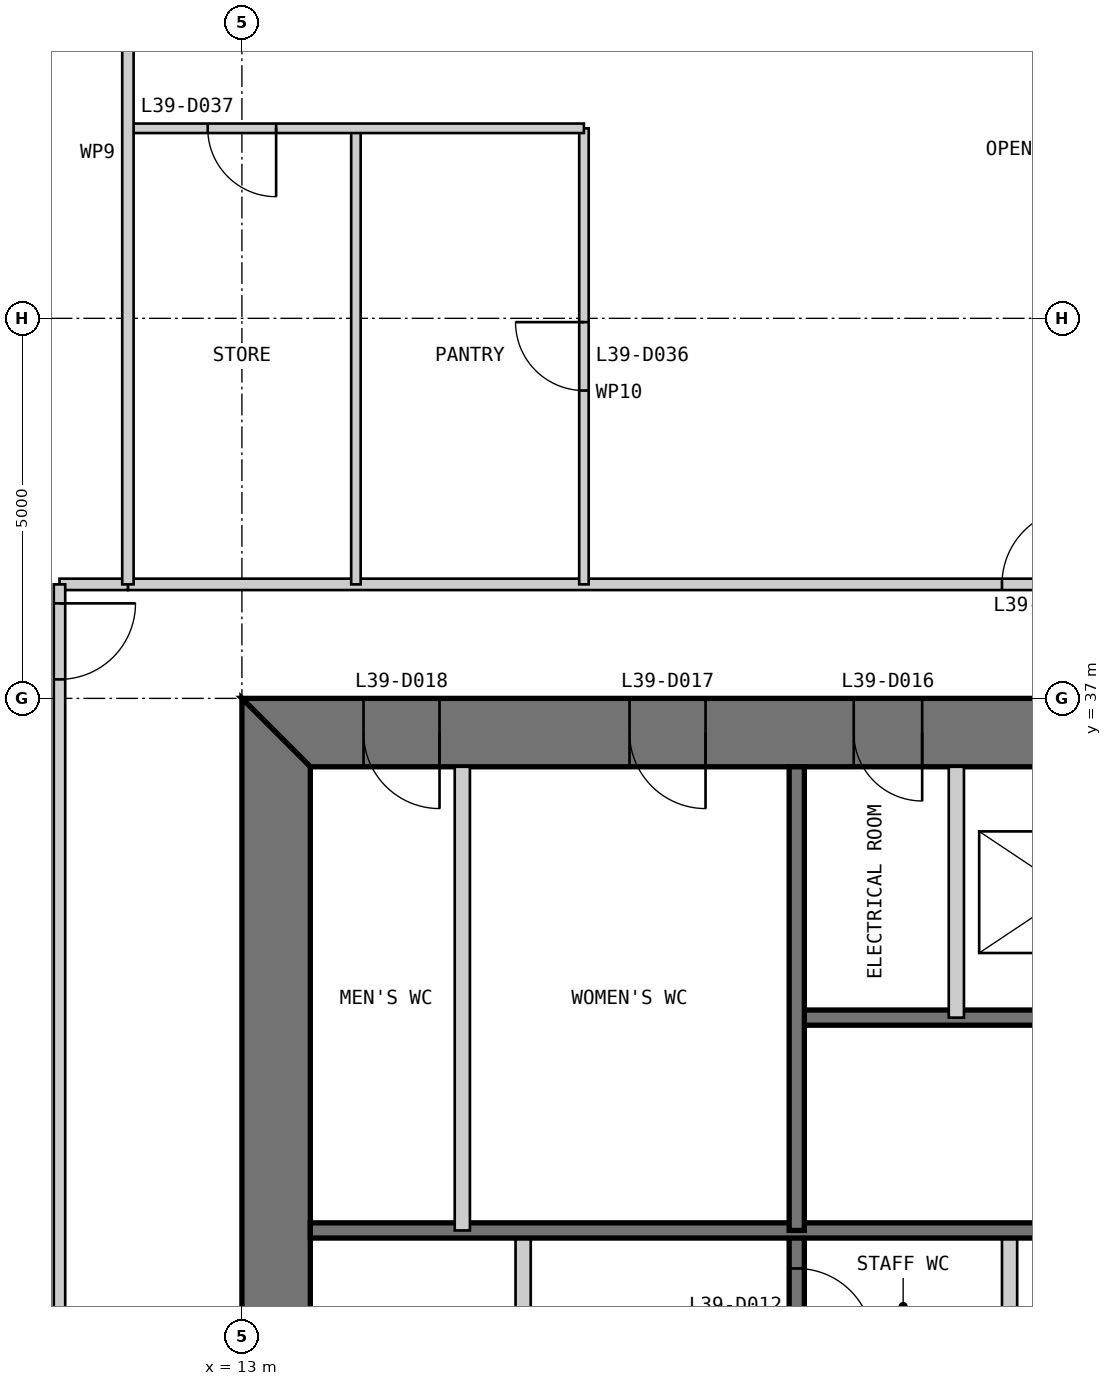
"""IFC4 building model, lengths in metres.
Left out: names, types, materials, properties, quantities, classifications, styles, units other than length and angle.
Written with IfcOpenShell. Run it as: python <this file> out.ifc"""

import sys

from ifc_helpers import new_model, si_unit, direction, frame, frame_2d, origin, place, context, subcontext, project, spatial, polyline, rectangle, outline, extrude, element, fill, save


model = new_model("IFC4")
c1 = context("Model", 3, precision=1e-05, world=origin(), true_north=direction((0.0, 1.0)))
c2 = subcontext(c1, "Body", "Model", "MODEL_VIEW")
j1 = project(units=[si_unit("LENGTHUNIT", "METRE"), si_unit("PLANEANGLEUNIT", "RADIAN")], contexts=[c1])
p1 = place(None, origin())
s1 = spatial("IfcSite", under=j1, at=p1, CompositionType="ELEMENT")
p2 = place(p1, origin())
s2 = spatial("IfcBuilding", under=s1, at=p2, CompositionType="ELEMENT")
p3 = place(p2, frame((0.0, 0.0, 168.4)))
s3 = spatial("IfcBuildingStorey", under=s2, at=p3, CompositionType="ELEMENT", Elevation=168.4)
p4 = place(p3, frame((37.0, 36.55, 0.0), z_axis=(0.0, 0.0, 1.0), x_axis=(-1.0, 0.0, 0.0)))
e1 = element("IfcWall", 1, at=p4, inside=s3, PredefinedType="SHEAR", context=c2, shape_type="SweptSolid", body=[
    extrude(outline(polyline([(0.0, -0.45), (24.0, -0.45), (23.1, 0.45), (0.9, 0.45), (0.0, -0.45)])), origin(), (0.0, 0.0, 1.0), 5.4),
])
p5 = place(p4, frame((4.9, 0.0, 0.0)))
e2 = element("IfcOpeningElement", 2, at=p5, cuts=e1, PredefinedType="OPENING", context=c2, shape_type="SweptSolid", body=[
    extrude(rectangle(XDim=1.0, YDim=2.2, at=frame_2d((0.5, 1.1))), frame((0.0, 0.46, 0.0), z_axis=(0.0, -1.0, 0.0), x_axis=(1.0, 0.0, 0.0)), (0.0, 0.0, 1.0), 0.92),
])
p6 = place(p4, frame((8.9, 0.0, 0.0)))
e3 = element("IfcOpeningElement", 3, at=p6, cuts=e1, PredefinedType="OPENING", context=c2, shape_type="SweptSolid", body=[
    extrude(rectangle(XDim=1.1, YDim=2.2, at=frame_2d((0.55, 1.1))), frame((0.0, 0.46, 0.0), z_axis=(0.0, -1.0, 0.0), x_axis=(1.0, 0.0, 0.0)), (0.0, 0.0, 1.0), 0.92),
])
p7 = place(p4, frame((15.05, 0.0, 0.0)))
e4 = element("IfcOpeningElement", 4, at=p7, cuts=e1, PredefinedType="OPENING", context=c2, shape_type="SweptSolid", body=[
    extrude(rectangle(XDim=0.9, YDim=2.2, at=frame_2d((0.45, 1.1))), frame((0.0, 0.46, 0.0), z_axis=(0.0, -1.0, 0.0), x_axis=(1.0, 0.0, 0.0)), (0.0, 0.0, 1.0), 0.92),
])
p8 = place(p4, frame((17.9, 0.0, 0.0)))
e5 = element("IfcOpeningElement", 5, at=p8, cuts=e1, PredefinedType="OPENING", context=c2, shape_type="SweptSolid", body=[
    extrude(rectangle(XDim=1.0, YDim=2.2, at=frame_2d((0.5, 1.1))), frame((0.0, 0.46, 0.0), z_axis=(0.0, -1.0, 0.0), x_axis=(1.0, 0.0, 0.0)), (0.0, 0.0, 1.0), 0.92),
])
p9 = place(p4, frame((21.4, 0.0, 0.0)))
e6 = element("IfcOpeningElement", 6, at=p9, cuts=e1, PredefinedType="OPENING", context=c2, shape_type="SweptSolid", body=[
    extrude(rectangle(XDim=1.0, YDim=2.2, at=frame_2d((0.5, 1.1))), frame((0.0, 0.46, 0.0), z_axis=(0.0, -1.0, 0.0), x_axis=(1.0, 0.0, 0.0)), (0.0, 0.0, 1.0), 0.92),
])
p10 = place(p3, frame((13.45, 36.1, 0.0), z_axis=(0.0, 0.0, 1.0), x_axis=(0.0, -1.0, 0.0)))
e7 = element("IfcWall", 7, at=p10, inside=s3, PredefinedType="SHEAR", context=c2, shape_type="SweptSolid", body=[
    extrude(outline(polyline([(-0.9, -0.45), (23.1, -0.45), (22.2, 0.45), (0.0, 0.45), (-0.9, -0.45)])), origin(), (0.0, 0.0, 1.0), 5.4),
])
p11 = place(p10, frame((20.2, 0.0, 0.0)))
e8 = element("IfcOpeningElement", 8, at=p11, cuts=e7, PredefinedType="OPENING", context=c2, shape_type="SweptSolid", body=[
    extrude(rectangle(XDim=1.0, YDim=2.2, at=frame_2d((0.5, 1.1))), frame((0.0, 0.46, 0.0), z_axis=(0.0, -1.0, 0.0), x_axis=(1.0, 0.0, 0.0)), (0.0, 0.0, 1.0), 0.92),
])
p12 = place(p10, frame((17.25, 0.0, 0.0)))
e9 = element("IfcOpeningElement", 9, at=p12, cuts=e7, PredefinedType="OPENING", context=c2, shape_type="SweptSolid", body=[
    extrude(rectangle(XDim=0.9, YDim=2.2, at=frame_2d((0.45, 1.1))), frame((0.0, 0.46, 0.0), z_axis=(0.0, -1.0, 0.0), x_axis=(1.0, 0.0, 0.0)), (0.0, 0.0, 1.0), 0.92),
])
p13 = place(p3, frame((16.7, 13.9, 0.0), z_axis=(0.0, 0.0, 1.0), x_axis=(0.0, 1.0, 0.0)))
e10 = element("IfcWall", 10, at=p13, inside=s3, PredefinedType="PARTITIONING", context=c2, shape_type="SweptSolid", body=[
    extrude(rectangle(XDim=16.1, YDim=0.2, at=frame_2d((8.05, 0.0))), origin(), (0.0, 0.0, 1.0), 5.2),
])
p14 = place(p13, frame((7.95, 0.0, 0.0)))
e11 = element("IfcOpeningElement", 11, at=p14, cuts=e10, PredefinedType="OPENING", context=c2, shape_type="SweptSolid", body=[
    extrude(rectangle(XDim=0.9, YDim=2.2, at=frame_2d((0.45, 1.1))), frame((0.0, 0.11, 0.0), z_axis=(0.0, -1.0, 0.0), x_axis=(1.0, 0.0, 0.0)), (0.0, 0.0, 1.0), 0.22),
])
p15 = place(p13, frame((13.3, 0.0, 0.0)))
e12 = element("IfcOpeningElement", 12, at=p15, cuts=e10, PredefinedType="OPENING", context=c2, shape_type="SweptSolid", body=[
    extrude(rectangle(XDim=0.9, YDim=2.2, at=frame_2d((0.45, 1.1))), frame((0.0, 0.11, 0.0), z_axis=(0.0, -1.0, 0.0), x_axis=(1.0, 0.0, 0.0)), (0.0, 0.0, 1.0), 0.22),
])
p16 = place(p3, frame((20.3, 13.9, 0.0), z_axis=(0.0, 0.0, 1.0), x_axis=(0.0, 1.0, 0.0)))
e13 = element("IfcWall", 13, at=p16, inside=s3, PredefinedType="SOLIDWALL", context=c2, shape_type="SweptSolid", body=[
    extrude(rectangle(XDim=16.1, YDim=0.2, at=frame_2d((8.05, 0.0))), origin(), (0.0, 0.0, 1.0), 5.2),
])
p17 = place(p16, frame((9.65, 0.0, 0.0)))
e14 = element("IfcOpeningElement", 14, at=p17, cuts=e13, PredefinedType="OPENING", context=c2, shape_type="SweptSolid", body=[
    extrude(rectangle(XDim=0.9, YDim=2.2, at=frame_2d((0.45, 1.1))), frame((0.0, 0.11, 0.0), z_axis=(0.0, -1.0, 0.0), x_axis=(1.0, 0.0, 0.0)), (0.0, 0.0, 1.0), 0.22),
])
p18 = place(p16, frame((14.6, 0.0, 0.0)))
e15 = element("IfcOpeningElement", 15, at=p18, cuts=e13, PredefinedType="OPENING", context=c2, shape_type="SweptSolid", body=[
    extrude(rectangle(XDim=1.0, YDim=2.2, at=frame_2d((0.5, 1.1))), frame((0.0, 0.11, 0.0), z_axis=(0.0, -1.0, 0.0), x_axis=(1.0, 0.0, 0.0)), (0.0, 0.0, 1.0), 0.22),
])
p19 = place(p3, frame((23.1, 20.0, 0.0), z_axis=(0.0, 0.0, 1.0), x_axis=(0.0, 1.0, 0.0)))
e16 = element("IfcWall", 16, at=p19, inside=s3, PredefinedType="PARTITIONING", context=c2, shape_type="SweptSolid", body=[
    extrude(rectangle(XDim=10.0, YDim=0.2, at=frame_2d((5.0, 0.0))), origin(), (0.0, 0.0, 1.0), 5.2),
])
p20 = place(p3, frame((29.7, 32.8, 0.0), z_axis=(0.0, 0.0, 1.0), x_axis=(-1.0, 0.0, 0.0)))
e17 = element("IfcWall", 17, at=p20, inside=s3, PredefinedType="SOLIDWALL", context=c2, shape_type="SweptSolid", body=[
    extrude(rectangle(XDim=9.4, YDim=0.2, at=frame_2d((4.7, 0.0))), origin(), (0.0, 0.0, 1.0), 5.2),
])
p21 = place(p20, frame((0.25, 0.0, 0.0)))
e18 = element("IfcOpeningElement", 18, at=p21, cuts=e17, PredefinedType="OPENING", context=c2, shape_type="SweptSolid", body=[
    extrude(rectangle(XDim=1.0, YDim=2.2, at=frame_2d((0.5, 1.1))), frame((0.0, 0.11, 0.0), z_axis=(0.0, -1.0, 0.0), x_axis=(1.0, 0.0, 0.0)), (0.0, 0.0, 1.0), 0.22),
])
p22 = place(p3, frame((29.7, 30.0, 0.0), z_axis=(0.0, 0.0, 1.0), x_axis=(-1.0, 0.0, 0.0)))
e19 = element("IfcWall", 19, at=p22, inside=s3, PredefinedType="SOLIDWALL", context=c2, shape_type="SweptSolid", body=[
    extrude(rectangle(XDim=15.8, YDim=0.2, at=frame_2d((7.9, 0.0))), origin(), (0.0, 0.0, 1.0), 5.2),
])
p23 = place(p3, frame((22.4, 36.1, 0.0), z_axis=(0.0, 0.0, 1.0), x_axis=(0.0, -1.0, 0.0)))
e20 = element("IfcWall", 20, at=p23, inside=s3, PredefinedType="PARTITIONING", context=c2, shape_type="SweptSolid", body=[
    extrude(rectangle(XDim=3.3, YDim=0.2, at=frame_2d((1.65, 0.0))), origin(), (0.0, 0.0, 1.0), 5.2),
])
p24 = place(p3, frame((20.3, 36.1, 0.0), z_axis=(0.0, 0.0, 1.0), x_axis=(0.0, -1.0, 0.0)))
e21 = element("IfcWall", 21, at=p24, inside=s3, PredefinedType="SOLIDWALL", context=c2, shape_type="SweptSolid", body=[
    extrude(rectangle(XDim=6.1, YDim=0.2, at=frame_2d((3.05, 0.0))), origin(), (0.0, 0.0, 1.0), 5.2),
])
p25 = place(p3, frame((15.9, 36.1, 0.0), z_axis=(0.0, 0.0, 1.0), x_axis=(0.0, -1.0, 0.0)))
e22 = element("IfcWall", 22, at=p25, inside=s3, PredefinedType="PARTITIONING", context=c2, shape_type="SweptSolid", body=[
    extrude(rectangle(XDim=6.1, YDim=0.2, at=frame_2d((3.05, 0.0))), origin(), (0.0, 0.0, 1.0), 5.2),
])
p26 = place(p3, frame((38.5, 38.5, 0.0), z_axis=(0.0, 0.0, 1.0), x_axis=(-1.0, 0.0, 0.0)))
e23 = element("IfcWall", 23, at=p26, inside=s3, PredefinedType="PARTITIONING", context=c2, shape_type="SweptSolid", body=[
    extrude(rectangle(XDim=27.0, YDim=0.15, at=frame_2d((13.5, 0.0))), origin(), (0.0, 0.0, 1.0), 5.25),
])
p27 = place(p26, frame((2.5, 0.0, 0.0)))
e24 = element("IfcOpeningElement", 24, at=p27, cuts=e23, PredefinedType="OPENING", context=c2, shape_type="SweptSolid", body=[
    extrude(rectangle(XDim=1.0, YDim=2.2, at=frame_2d((0.5, 1.1))), frame((0.0, 0.085, 0.0), z_axis=(0.0, -1.0, 0.0), x_axis=(1.0, 0.0, 0.0)), (0.0, 0.0, 1.0), 0.17),
])
p28 = place(p26, frame((7.0, 0.0, 0.0)))
e25 = element("IfcOpeningElement", 25, at=p28, cuts=e23, PredefinedType="OPENING", context=c2, shape_type="SweptSolid", body=[
    extrude(rectangle(XDim=1.0, YDim=2.2, at=frame_2d((0.5, 1.1))), frame((0.0, 0.085, 0.0), z_axis=(0.0, -1.0, 0.0), x_axis=(1.0, 0.0, 0.0)), (0.0, 0.0, 1.0), 0.17),
])
p29 = place(p26, frame((14.5, 0.0, 0.0)))
e26 = element("IfcOpeningElement", 26, at=p29, cuts=e23, PredefinedType="OPENING", context=c2, shape_type="SweptSolid", body=[
    extrude(rectangle(XDim=1.0, YDim=2.2, at=frame_2d((0.5, 1.1))), frame((0.0, 0.085, 0.0), z_axis=(0.0, -1.0, 0.0), x_axis=(1.0, 0.0, 0.0)), (0.0, 0.0, 1.0), 0.17),
])
p30 = place(p3, frame((17.5, 44.5, 0.0), z_axis=(0.0, 0.0, 1.0), x_axis=(0.0, -1.0, 0.0)))
e27 = element("IfcWall", 27, at=p30, inside=s3, PredefinedType="PARTITIONING", context=c2, shape_type="SweptSolid", body=[
    extrude(rectangle(XDim=6.0, YDim=0.125, at=frame_2d((3.0, 0.0))), origin(), (0.0, 0.0, 1.0), 5.25),
])
p31 = place(p30, frame((2.55, 0.0, 0.0)))
e28 = element("IfcOpeningElement", 28, at=p31, cuts=e27, PredefinedType="OPENING", context=c2, shape_type="SweptSolid", body=[
    extrude(rectangle(XDim=0.9, YDim=2.2, at=frame_2d((0.45, 1.1))), frame((0.0, 0.073, 0.0), z_axis=(0.0, -1.0, 0.0), x_axis=(1.0, 0.0, 0.0)), (0.0, 0.0, 1.0), 0.145),
])
p32 = place(p3, frame((14.5, 44.5, 0.0), z_axis=(0.0, 0.0, 1.0), x_axis=(0.0, -1.0, 0.0)))
e29 = element("IfcWall", 29, at=p32, inside=s3, PredefinedType="PARTITIONING", context=c2, shape_type="SweptSolid", body=[
    extrude(rectangle(XDim=6.0, YDim=0.125, at=frame_2d((3.0, 0.0))), origin(), (0.0, 0.0, 1.0), 5.25),
])
p33 = place(p3, frame((17.5, 44.5, 0.0), z_axis=(0.0, 0.0, 1.0), x_axis=(-1.0, 0.0, 0.0)))
e30 = element("IfcWall", 30, at=p33, inside=s3, PredefinedType="PARTITIONING", context=c2, shape_type="SweptSolid", body=[
    extrude(rectangle(XDim=6.0, YDim=0.125, at=frame_2d((3.0, 0.0))), origin(), (0.0, 0.0, 1.0), 5.25),
])
p34 = place(p33, frame((4.05, 0.0, 0.0)))
e31 = element("IfcOpeningElement", 31, at=p34, cuts=e30, PredefinedType="OPENING", context=c2, shape_type="SweptSolid", body=[
    extrude(rectangle(XDim=0.9, YDim=2.2, at=frame_2d((0.45, 1.1))), frame((0.0, 0.073, 0.0), z_axis=(0.0, -1.0, 0.0), x_axis=(1.0, 0.0, 0.0)), (0.0, 0.0, 1.0), 0.145),
])
p35 = place(p3, frame((11.5, 38.5, 0.0), z_axis=(0.0, 0.0, 1.0), x_axis=(-1.0, 0.0, 0.0)))
e32 = element("IfcWall", 32, at=p35, inside=s3, PredefinedType="PARTITIONING", context=c2, shape_type="SweptSolid", body=[
    extrude(rectangle(XDim=0.9, YDim=0.15, at=frame_2d((0.45, 0.0))), origin(), (0.0, 0.0, 1.0), 5.25),
])
p36 = place(p3, frame((10.6, 38.5, 0.0), z_axis=(0.0, 0.0, 1.0), x_axis=(0.0, -1.0, 0.0)))
e33 = element("IfcWall", 33, at=p36, inside=s3, PredefinedType="PARTITIONING", context=c2, shape_type="SweptSolid", body=[
    extrude(rectangle(XDim=27.9, YDim=0.15, at=frame_2d((13.95, 0.0))), origin(), (0.0, 0.0, 1.0), 5.25),
])
p37 = place(p36, frame((0.25, 0.0, 0.0)))
e34 = element("IfcOpeningElement", 34, at=p37, cuts=e33, PredefinedType="OPENING", context=c2, shape_type="SweptSolid", body=[
    extrude(rectangle(XDim=1.0, YDim=2.2, at=frame_2d((0.5, 1.1))), frame((0.0, 0.085, 0.0), z_axis=(0.0, -1.0, 0.0), x_axis=(1.0, 0.0, 0.0)), (0.0, 0.0, 1.0), 0.17),
])
p38 = place(p36, frame((16.75, 0.0, 0.0)))
e35 = element("IfcOpeningElement", 35, at=p38, cuts=e33, PredefinedType="OPENING", context=c2, shape_type="SweptSolid", body=[
    extrude(rectangle(XDim=1.0, YDim=2.2, at=frame_2d((0.5, 1.1))), frame((0.0, 0.085, 0.0), z_axis=(0.0, -1.0, 0.0), x_axis=(1.0, 0.0, 0.0)), (0.0, 0.0, 1.0), 0.17),
])
p39 = place(p36, frame((23.5, 0.0, 0.0)))
e36 = element("IfcOpeningElement", 36, at=p39, cuts=e33, PredefinedType="OPENING", context=c2, shape_type="SweptSolid", body=[
    extrude(rectangle(XDim=1.0, YDim=2.2, at=frame_2d((0.5, 1.1))), frame((0.0, 0.085, 0.0), z_axis=(0.0, -1.0, 0.0), x_axis=(1.0, 0.0, 0.0)), (0.0, 0.0, 1.0), 0.17),
])
p40 = place(p3, frame((11.5, 49.85, 0.0), z_axis=(0.0, 0.0, 1.0), x_axis=(0.0, -1.0, 0.0)))
e37 = element("IfcWall", 37, at=p40, inside=s3, PredefinedType="PARTITIONING", context=c2, shape_type="SweptSolid", body=[
    extrude(rectangle(XDim=11.35, YDim=0.15, at=frame_2d((5.675, 0.0))), origin(), (0.0, 0.0, 1.0), 5.25),
])
p41 = place(p18, frame((1.0, 0.0, 0.0), z_axis=(0.0, 0.0, 1.0), x_axis=(-1.0, 0.0, 0.0)))
e38 = element("IfcDoor", 38, at=p41, inside=s3, OperationType="SINGLE_SWING_RIGHT", PredefinedType="DOOR", context=c2, shape_type="SweptSolid", body=[
    extrude(rectangle(XDim=1.0, YDim=2.2, at=frame_2d((0.5, 1.1))), frame((0.0, 0.025, 0.0), z_axis=(0.0, -1.0, 0.0), x_axis=(1.0, 0.0, 0.0)), (0.0, 0.0, 1.0), 0.05),
])
fill(e15, e38)
p42 = place(p7, origin())
e39 = element("IfcDoor", 39, at=p42, inside=s3, OperationType="SINGLE_SWING_LEFT", PredefinedType="DOOR", context=c2, shape_type="SweptSolid", body=[
    extrude(rectangle(XDim=0.9, YDim=2.2, at=frame_2d((0.45, 1.1))), frame((0.0, 0.025, 0.0), z_axis=(0.0, -1.0, 0.0), x_axis=(1.0, 0.0, 0.0)), (0.0, 0.0, 1.0), 0.05),
    extrude(outline(polyline([(0.0, 0.0), (0.04, 0.0), (0.04, 2.16), (0.86, 2.16), (0.86, 0.0), (0.9, 0.0), (0.9, 2.2), (0.0, 2.2), (0.0, 0.0)])), frame((0.0, 0.3, 0.0), z_axis=(0.0, -1.0, 0.0), x_axis=(1.0, 0.0, 0.0)), (0.0, 0.0, 1.0), 0.6),
])
fill(e4, e39)
p43 = place(p8, origin())
e40 = element("IfcDoor", 40, at=p43, inside=s3, OperationType="SINGLE_SWING_LEFT", PredefinedType="DOOR", context=c2, shape_type="SweptSolid", body=[
    extrude(rectangle(XDim=1.0, YDim=2.2, at=frame_2d((0.5, 1.1))), frame((0.0, 0.025, 0.0), z_axis=(0.0, -1.0, 0.0), x_axis=(1.0, 0.0, 0.0)), (0.0, 0.0, 1.0), 0.05),
    extrude(outline(polyline([(0.0, 0.0), (0.04, 0.0), (0.04, 2.16), (0.96, 2.16), (0.96, 0.0), (1.0, 0.0), (1.0, 2.2), (0.0, 2.2), (0.0, 0.0)])), frame((0.0, 0.3, 0.0), z_axis=(0.0, -1.0, 0.0), x_axis=(1.0, 0.0, 0.0)), (0.0, 0.0, 1.0), 0.6),
])
fill(e5, e40)
p44 = place(p9, origin())
e41 = element("IfcDoor", 41, at=p44, inside=s3, OperationType="SINGLE_SWING_LEFT", PredefinedType="DOOR", context=c2, shape_type="SweptSolid", body=[
    extrude(rectangle(XDim=1.0, YDim=2.2, at=frame_2d((0.5, 1.1))), frame((0.0, 0.025, 0.0), z_axis=(0.0, -1.0, 0.0), x_axis=(1.0, 0.0, 0.0)), (0.0, 0.0, 1.0), 0.05),
    extrude(outline(polyline([(0.0, 0.0), (0.04, 0.0), (0.04, 2.16), (0.96, 2.16), (0.96, 0.0), (1.0, 0.0), (1.0, 2.2), (0.0, 2.2), (0.0, 0.0)])), frame((0.0, 0.3, 0.0), z_axis=(0.0, -1.0, 0.0), x_axis=(1.0, 0.0, 0.0)), (0.0, 0.0, 1.0), 0.6),
])
fill(e6, e41)
p45 = place(p29, frame((1.0, 0.0, 0.0), z_axis=(0.0, 0.0, 1.0), x_axis=(-1.0, 0.0, 0.0)))
e42 = element("IfcDoor", 42, at=p45, inside=s3, OperationType="SINGLE_SWING_RIGHT", PredefinedType="DOOR", context=c2, shape_type="SweptSolid", body=[
    extrude(rectangle(XDim=1.0, YDim=2.2, at=frame_2d((0.5, 1.1))), frame((0.0, 0.025, 0.0), z_axis=(0.0, -1.0, 0.0), x_axis=(1.0, 0.0, 0.0)), (0.0, 0.0, 1.0), 0.05),
])
fill(e26, e42)
p46 = place(p31, frame((0.9, 0.0, 0.0), z_axis=(0.0, 0.0, 1.0), x_axis=(-1.0, 0.0, 0.0)))
e43 = element("IfcDoor", 43, at=p46, inside=s3, OperationType="SINGLE_SWING_RIGHT", PredefinedType="DOOR", context=c2, shape_type="SweptSolid", body=[
    extrude(rectangle(XDim=0.9, YDim=2.2, at=frame_2d((0.45, 1.1))), frame((0.0, 0.025, 0.0), z_axis=(0.0, -1.0, 0.0), x_axis=(1.0, 0.0, 0.0)), (0.0, 0.0, 1.0), 0.05),
])
fill(e28, e43)
p47 = place(p34, origin())
e44 = element("IfcDoor", 44, at=p47, inside=s3, OperationType="SINGLE_SWING_LEFT", PredefinedType="DOOR", context=c2, shape_type="SweptSolid", body=[
    extrude(rectangle(XDim=0.9, YDim=2.2, at=frame_2d((0.45, 1.1))), frame((0.0, 0.025, 0.0), z_axis=(0.0, -1.0, 0.0), x_axis=(1.0, 0.0, 0.0)), (0.0, 0.0, 1.0), 0.05),
])
fill(e31, e44)
p48 = place(p37, origin())
e45 = element("IfcDoor", 45, at=p48, inside=s3, OperationType="SINGLE_SWING_LEFT", PredefinedType="DOOR", context=c2, shape_type="SweptSolid", body=[
    extrude(rectangle(XDim=1.0, YDim=2.2, at=frame_2d((0.5, 1.1))), frame((0.0, 0.025, 0.0), z_axis=(0.0, -1.0, 0.0), x_axis=(1.0, 0.0, 0.0)), (0.0, 0.0, 1.0), 0.05),
])
fill(e34, e45)
save(model, sys.argv[1])
